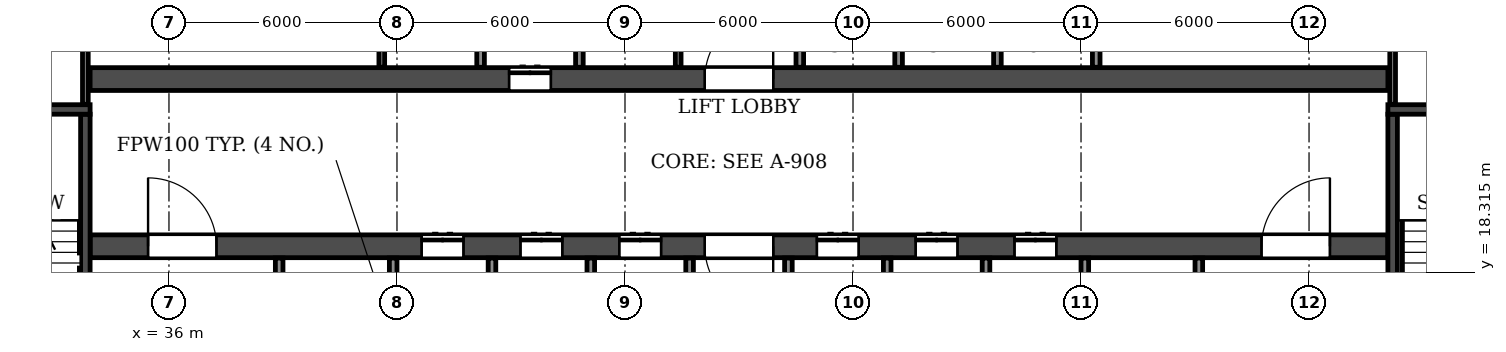
"""IFC4 building model, lengths in metres.
Left out: names, types, materials, properties, quantities, classifications, styles, units other than length and angle.
Written with IfcOpenShell. Run it as: python <this file> out.ifc"""

import sys

from ifc_helpers import new_model, si_unit, direction, frame, frame_2d, origin, place, context, subcontext, project, spatial, rectangle, extrude, element, fill, save


model = new_model("IFC4")
c1 = context("Model", 3, precision=1e-05, world=origin(), true_north=direction((0.0, 1.0)))
c2 = subcontext(c1, "Body", "Model", "MODEL_VIEW")
j1 = project(units=[si_unit("LENGTHUNIT", "METRE"), si_unit("PLANEANGLEUNIT", "RADIAN")], contexts=[c1])
p1 = place(None, origin())
s1 = spatial("IfcSite", under=j1, at=p1, CompositionType="ELEMENT")
p2 = place(p1, origin())
s2 = spatial("IfcBuilding", under=s1, at=p2, CompositionType="ELEMENT")
p3 = place(p2, frame((0.0, 0.0, 33.3)))
s3 = spatial("IfcBuildingStorey", under=s2, at=p3, CompositionType="ELEMENT", Elevation=33.3)
p4 = place(p3, frame((33.925, 19.0, 0.0), z_axis=(0.0, 0.0, 1.0), x_axis=(1.0, 0.0, 0.0)))
e1 = element("IfcWall", 1, at=p4, inside=s3, PredefinedType="SOLIDWALL", context=c2, shape_type="SweptSolid", body=[
    extrude(rectangle(XDim=34.15, YDim=0.6, at=frame_2d((17.075, 0.0))), origin(), (0.0, 0.0, 1.0), 3.05),
])
p5 = place(p4, frame((16.175, 0.0, 0.0)))
e2 = element("IfcOpeningElement", 2, at=p5, cuts=e1, PredefinedType="OPENING", context=c2, shape_type="SweptSolid", body=[
    extrude(rectangle(XDim=1.8, YDim=2.1, at=frame_2d((0.9, 1.05))), frame((0.0, 0.31, 0.0), z_axis=(0.0, -1.0, 0.0), x_axis=(1.0, 0.0, 0.0)), (0.0, 0.0, 1.0), 0.62),
])
p6 = place(p4, frame((1.525, 0.0, 0.0)))
e3 = element("IfcOpeningElement", 3, at=p6, cuts=e1, PredefinedType="OPENING", context=c2, shape_type="SweptSolid", body=[
    extrude(rectangle(XDim=1.8, YDim=2.1, at=frame_2d((0.9, 1.05))), frame((0.0, 0.31, 0.0), z_axis=(0.0, -1.0, 0.0), x_axis=(1.0, 0.0, 0.0)), (0.0, 0.0, 1.0), 0.62),
])
p7 = place(p4, frame((8.725, 0.0, 0.0)))
e4 = element("IfcOpeningElement", 4, at=p7, cuts=e1, PredefinedType="OPENING", context=c2, shape_type="SweptSolid", body=[
    extrude(rectangle(XDim=1.1, YDim=2.1, at=frame_2d((0.55, 1.05))), frame((0.0, 0.31, 0.0), z_axis=(0.0, -1.0, 0.0), x_axis=(1.0, 0.0, 0.0)), (0.0, 0.0, 1.0), 0.62),
])
p8 = place(p4, frame((11.325, 0.0, 0.0)))
e5 = element("IfcOpeningElement", 5, at=p8, cuts=e1, PredefinedType="OPENING", context=c2, shape_type="SweptSolid", body=[
    extrude(rectangle(XDim=1.1, YDim=2.1, at=frame_2d((0.55, 1.05))), frame((0.0, 0.31, 0.0), z_axis=(0.0, -1.0, 0.0), x_axis=(1.0, 0.0, 0.0)), (0.0, 0.0, 1.0), 0.62),
])
p9 = place(p4, frame((13.925, 0.0, 0.0)))
e6 = element("IfcOpeningElement", 6, at=p9, cuts=e1, PredefinedType="OPENING", context=c2, shape_type="SweptSolid", body=[
    extrude(rectangle(XDim=1.1, YDim=2.1, at=frame_2d((0.55, 1.05))), frame((0.0, 0.31, 0.0), z_axis=(0.0, -1.0, 0.0), x_axis=(1.0, 0.0, 0.0)), (0.0, 0.0, 1.0), 0.62),
])
p10 = place(p4, frame((19.125, 0.0, 0.0)))
e7 = element("IfcOpeningElement", 7, at=p10, cuts=e1, PredefinedType="OPENING", context=c2, shape_type="SweptSolid", body=[
    extrude(rectangle(XDim=1.1, YDim=2.1, at=frame_2d((0.55, 1.05))), frame((0.0, 0.31, 0.0), z_axis=(0.0, -1.0, 0.0), x_axis=(1.0, 0.0, 0.0)), (0.0, 0.0, 1.0), 0.62),
])
p11 = place(p4, frame((21.725, 0.0, 0.0)))
e8 = element("IfcOpeningElement", 8, at=p11, cuts=e1, PredefinedType="OPENING", context=c2, shape_type="SweptSolid", body=[
    extrude(rectangle(XDim=1.1, YDim=2.1, at=frame_2d((0.55, 1.05))), frame((0.0, 0.31, 0.0), z_axis=(0.0, -1.0, 0.0), x_axis=(1.0, 0.0, 0.0)), (0.0, 0.0, 1.0), 0.62),
])
p12 = place(p4, frame((24.325, 0.0, 0.0)))
e9 = element("IfcOpeningElement", 9, at=p12, cuts=e1, PredefinedType="OPENING", context=c2, shape_type="SweptSolid", body=[
    extrude(rectangle(XDim=1.1, YDim=2.1, at=frame_2d((0.55, 1.05))), frame((0.0, 0.31, 0.0), z_axis=(0.0, -1.0, 0.0), x_axis=(1.0, 0.0, 0.0)), (0.0, 0.0, 1.0), 0.62),
])
p13 = place(p4, frame((30.825, 0.0, 0.0)))
e10 = element("IfcOpeningElement", 10, at=p13, cuts=e1, PredefinedType="OPENING", context=c2, shape_type="SweptSolid", body=[
    extrude(rectangle(XDim=1.8, YDim=2.1, at=frame_2d((0.9, 1.05))), frame((0.0, 0.31, 0.0), z_axis=(0.0, -1.0, 0.0), x_axis=(1.0, 0.0, 0.0)), (0.0, 0.0, 1.0), 0.62),
])
p14 = place(p3, frame((33.925, 23.4, 0.0), z_axis=(0.0, 0.0, 1.0), x_axis=(1.0, 0.0, 0.0)))
e11 = element("IfcWall", 11, at=p14, inside=s3, PredefinedType="SOLIDWALL", context=c2, shape_type="SweptSolid", body=[
    extrude(rectangle(XDim=34.15, YDim=0.6, at=frame_2d((17.075, 0.0))), origin(), (0.0, 0.0, 1.0), 3.05),
])
p15 = place(p14, frame((16.175, 0.0, 0.0)))
e12 = element("IfcOpeningElement", 12, at=p15, cuts=e11, PredefinedType="OPENING", context=c2, shape_type="SweptSolid", body=[
    extrude(rectangle(XDim=1.8, YDim=2.1, at=frame_2d((0.9, 1.05))), frame((0.0, 0.31, 0.0), z_axis=(0.0, -1.0, 0.0), x_axis=(1.0, 0.0, 0.0)), (0.0, 0.0, 1.0), 0.62),
])
p16 = place(p14, frame((11.025, 0.0, 0.0)))
e13 = element("IfcOpeningElement", 13, at=p16, cuts=e11, PredefinedType="OPENING", context=c2, shape_type="SweptSolid", body=[
    extrude(rectangle(XDim=1.1, YDim=2.1, at=frame_2d((0.55, 1.05))), frame((0.0, 0.31, 0.0), z_axis=(0.0, -1.0, 0.0), x_axis=(1.0, 0.0, 0.0)), (0.0, 0.0, 1.0), 0.62),
])
p17 = place(p3, frame((33.8, 14.9, 0.0), z_axis=(0.0, 0.0, 1.0), x_axis=(0.0, 1.0, 0.0)))
e14 = element("IfcWall", 14, at=p17, inside=s3, PredefinedType="SOLIDWALL", context=c2, shape_type="SweptSolid", body=[
    extrude(rectangle(XDim=7.575, YDim=0.25, at=frame_2d((3.788, 0.0))), origin(), (0.0, 0.0, 1.0), 3.05),
])
p18 = place(p17, frame((0.4, 0.0, 0.0)))
e15 = element("IfcOpeningElement", 15, at=p18, cuts=e14, PredefinedType="OPENING", context=c2, shape_type="SweptSolid", body=[
    extrude(rectangle(XDim=1.0, YDim=2.1, at=frame_2d((0.5, 1.05))), frame((0.0, 0.135, 0.0), z_axis=(0.0, -1.0, 0.0), x_axis=(1.0, 0.0, 0.0)), (0.0, 0.0, 1.0), 0.27),
])
p19 = place(p3, frame((29.875, 22.6, 0.0), z_axis=(0.0, 0.0, 1.0), x_axis=(1.0, 0.0, 0.0)))
e16 = element("IfcWall", 16, at=p19, inside=s3, PredefinedType="SOLIDWALL", context=c2, shape_type="SweptSolid", body=[
    extrude(rectangle(XDim=4.05, YDim=0.25, at=frame_2d((2.025, 0.0))), origin(), (0.0, 0.0, 1.0), 3.05),
])
p20 = place(p3, frame((68.2, 14.9, 0.0), z_axis=(0.0, 0.0, 1.0), x_axis=(0.0, 1.0, 0.0)))
e17 = element("IfcWall", 17, at=p20, inside=s3, PredefinedType="SOLIDWALL", context=c2, shape_type="SweptSolid", body=[
    extrude(rectangle(XDim=7.575, YDim=0.25, at=frame_2d((3.788, 0.0))), origin(), (0.0, 0.0, 1.0), 3.05),
])
p21 = place(p20, frame((0.4, 0.0, 0.0)))
e18 = element("IfcOpeningElement", 18, at=p21, cuts=e17, PredefinedType="OPENING", context=c2, shape_type="SweptSolid", body=[
    extrude(rectangle(XDim=1.0, YDim=2.1, at=frame_2d((0.5, 1.05))), frame((0.0, 0.135, 0.0), z_axis=(0.0, -1.0, 0.0), x_axis=(1.0, 0.0, 0.0)), (0.0, 0.0, 1.0), 0.27),
])
p22 = place(p3, frame((68.075, 22.6, 0.0), z_axis=(0.0, 0.0, 1.0), x_axis=(1.0, 0.0, 0.0)))
e19 = element("IfcWall", 19, at=p22, inside=s3, PredefinedType="SOLIDWALL", context=c2, shape_type="SweptSolid", body=[
    extrude(rectangle(XDim=4.05, YDim=0.25, at=frame_2d((2.025, 0.0))), origin(), (0.0, 0.0, 1.0), 3.05),
])
for number, where, z_axis, x_axis in (
    (20, (49.4, 23.71, 0.0), (0.0, 0.0, 1.0), (0.0, 1.0, 0.0)),
    (21, (41.6, 23.71, 0.0), (0.0, 0.0, 1.0), (0.0, 1.0, 0.0)),
):
    element("IfcWall", number, at=place(p3, frame(where, z_axis=z_axis, x_axis=x_axis)), inside=s3, PredefinedType="PARTITIONING", context=c2, shape_type="SweptSolid", body=[
        extrude(rectangle(XDim=3.78, YDim=0.15, at=frame_2d((1.89, 0.0))), origin(), (0.0, 0.0, 1.0), 3.05),
    ])
for number, where, z_axis, x_axis in (
    (22, (33.8, 22.735, 0.0), (0.0, 0.0, 1.0), (0.0, 1.0, 0.0)),
    (23, (68.2, 22.735, 0.0), (0.0, 0.0, 1.0), (0.0, 1.0, 0.0)),
):
    element("IfcWall", number, at=place(p3, frame(where, z_axis=z_axis, x_axis=x_axis)), inside=s3, PredefinedType="PARTITIONING", context=c2, shape_type="SweptSolid", body=[
        extrude(rectangle(XDim=4.755, YDim=0.15, at=frame_2d((2.377, 0.0))), origin(), (0.0, 0.0, 1.0), 3.05),
    ])
p23 = place(p3, frame((38.9, 14.91, 0.0), z_axis=(0.0, 0.0, 1.0), x_axis=(0.0, 1.0, 0.0)))
e24 = element("IfcWall", 24, at=p23, inside=s3, PredefinedType="PARTITIONING", context=c2, shape_type="SweptSolid", body=[
    extrude(rectangle(XDim=3.78, YDim=0.2, at=frame_2d((1.89, 0.0))), origin(), (0.0, 0.0, 1.0), 3.05),
])
p24 = place(p23, frame((1.34, 0.0, 0.0)))
e25 = element("IfcOpeningElement", 25, at=p24, cuts=e24, PredefinedType="OPENING", context=c2, shape_type="SweptSolid", body=[
    extrude(rectangle(XDim=1.1, YDim=2.1, at=frame_2d((0.55, 1.05))), frame((0.0, 0.11, 0.0), z_axis=(0.0, -1.0, 0.0), x_axis=(1.0, 0.0, 0.0)), (0.0, 0.0, 1.0), 0.22),
])
for number, where, z_axis, x_axis in (
    (26, (41.9, 14.91, 0.0), (0.0, 0.0, 1.0), (0.0, 1.0, 0.0)),
    (27, (44.2, 23.71, 0.0), (0.0, 0.0, 1.0), (0.0, 1.0, 0.0)),
):
    element("IfcWall", number, at=place(p3, frame(where, z_axis=z_axis, x_axis=x_axis)), inside=s3, PredefinedType="PARTITIONING", context=c2, shape_type="SweptSolid", body=[
        extrude(rectangle(XDim=3.78, YDim=0.2, at=frame_2d((1.89, 0.0))), origin(), (0.0, 0.0, 1.0), 3.05),
    ])
p25 = place(p3, frame((44.5, 16.3, 0.0), z_axis=(0.0, 0.0, 1.0), x_axis=(0.0, 1.0, 0.0)))
e28 = element("IfcWall", 28, at=p25, inside=s3, PredefinedType="PARTITIONING", context=c2, shape_type="SweptSolid", body=[
    extrude(rectangle(XDim=2.39, YDim=0.2, at=frame_2d((1.195, 0.0))), origin(), (0.0, 0.0, 1.0), 3.05),
])
p26 = place(p3, frame((46.8, 23.71, 0.0), z_axis=(0.0, 0.0, 1.0), x_axis=(0.0, 1.0, 0.0)))
e29 = element("IfcWall", 29, at=p26, inside=s3, PredefinedType="PARTITIONING", context=c2, shape_type="SweptSolid", body=[
    extrude(rectangle(XDim=3.78, YDim=0.2, at=frame_2d((1.89, 0.0))), origin(), (0.0, 0.0, 1.0), 3.05),
])
for number, where, z_axis, x_axis in (
    (30, (47.1, 16.3, 0.0), (0.0, 0.0, 1.0), (0.0, 1.0, 0.0)),
    (31, (49.7, 16.3, 0.0), (0.0, 0.0, 1.0), (0.0, 1.0, 0.0)),
    (32, (52.3, 16.3, 0.0), (0.0, 0.0, 1.0), (0.0, 1.0, 0.0)),
):
    element("IfcWall", number, at=place(p3, frame(where, z_axis=z_axis, x_axis=x_axis)), inside=s3, PredefinedType="PARTITIONING", context=c2, shape_type="SweptSolid", body=[
        extrude(rectangle(XDim=2.39, YDim=0.2, at=frame_2d((1.195, 0.0))), origin(), (0.0, 0.0, 1.0), 3.05),
    ])
p27 = place(p3, frame((52.6, 23.71, 0.0), z_axis=(0.0, 0.0, 1.0), x_axis=(0.0, 1.0, 0.0)))
e33 = element("IfcWall", 33, at=p27, inside=s3, PredefinedType="PARTITIONING", context=c2, shape_type="SweptSolid", body=[
    extrude(rectangle(XDim=2.39, YDim=0.2, at=frame_2d((1.195, 0.0))), origin(), (0.0, 0.0, 1.0), 3.05),
])
p28 = place(p3, frame((54.9, 16.3, 0.0), z_axis=(0.0, 0.0, 1.0), x_axis=(0.0, 1.0, 0.0)))
e34 = element("IfcWall", 34, at=p28, inside=s3, PredefinedType="PARTITIONING", context=c2, shape_type="SweptSolid", body=[
    extrude(rectangle(XDim=2.39, YDim=0.2, at=frame_2d((1.195, 0.0))), origin(), (0.0, 0.0, 1.0), 3.05),
])
p29 = place(p3, frame((55.2, 23.71, 0.0), z_axis=(0.0, 0.0, 1.0), x_axis=(0.0, 1.0, 0.0)))
e35 = element("IfcWall", 35, at=p29, inside=s3, PredefinedType="PARTITIONING", context=c2, shape_type="SweptSolid", body=[
    extrude(rectangle(XDim=2.39, YDim=0.2, at=frame_2d((1.195, 0.0))), origin(), (0.0, 0.0, 1.0), 3.05),
])
p30 = place(p3, frame((57.5, 16.3, 0.0), z_axis=(0.0, 0.0, 1.0), x_axis=(0.0, 1.0, 0.0)))
e36 = element("IfcWall", 36, at=p30, inside=s3, PredefinedType="PARTITIONING", context=c2, shape_type="SweptSolid", body=[
    extrude(rectangle(XDim=2.39, YDim=0.2, at=frame_2d((1.195, 0.0))), origin(), (0.0, 0.0, 1.0), 3.05),
])
p31 = place(p3, frame((57.8, 23.71, 0.0), z_axis=(0.0, 0.0, 1.0), x_axis=(0.0, 1.0, 0.0)))
e37 = element("IfcWall", 37, at=p31, inside=s3, PredefinedType="PARTITIONING", context=c2, shape_type="SweptSolid", body=[
    extrude(rectangle(XDim=2.39, YDim=0.2, at=frame_2d((1.195, 0.0))), origin(), (0.0, 0.0, 1.0), 3.05),
])
p32 = place(p3, frame((60.1, 14.91, 0.0), z_axis=(0.0, 0.0, 1.0), x_axis=(0.0, 1.0, 0.0)))
e38 = element("IfcWall", 38, at=p32, inside=s3, PredefinedType="PARTITIONING", context=c2, shape_type="SweptSolid", body=[
    extrude(rectangle(XDim=3.78, YDim=0.2, at=frame_2d((1.89, 0.0))), origin(), (0.0, 0.0, 1.0), 3.05),
])
p33 = place(p3, frame((60.4, 23.71, 0.0), z_axis=(0.0, 0.0, 1.0), x_axis=(0.0, 1.0, 0.0)))
e39 = element("IfcWall", 39, at=p33, inside=s3, PredefinedType="PARTITIONING", context=c2, shape_type="SweptSolid", body=[
    extrude(rectangle(XDim=2.39, YDim=0.2, at=frame_2d((1.195, 0.0))), origin(), (0.0, 0.0, 1.0), 3.05),
])
p34 = place(p3, frame((63.1, 14.91, 0.0), z_axis=(0.0, 0.0, 1.0), x_axis=(0.0, 1.0, 0.0)))
e40 = element("IfcWall", 40, at=p34, inside=s3, PredefinedType="PARTITIONING", context=c2, shape_type="SweptSolid", body=[
    extrude(rectangle(XDim=3.78, YDim=0.2, at=frame_2d((1.89, 0.0))), origin(), (0.0, 0.0, 1.0), 3.05),
])
p35 = place(p34, frame((1.34, 0.0, 0.0)))
e41 = element("IfcOpeningElement", 41, at=p35, cuts=e40, PredefinedType="OPENING", context=c2, shape_type="SweptSolid", body=[
    extrude(rectangle(XDim=1.1, YDim=2.1, at=frame_2d((0.55, 1.05))), frame((0.0, 0.11, 0.0), z_axis=(0.0, -1.0, 0.0), x_axis=(1.0, 0.0, 0.0)), (0.0, 0.0, 1.0), 0.22),
])
p36 = place(p15, origin())
e42 = element("IfcDoor", 42, at=p36, inside=s3, OperationType="DOUBLE_DOOR_SINGLE_SWING", PredefinedType="DOOR", context=c2, shape_type="SweptSolid", body=[
    extrude(rectangle(XDim=1.8, YDim=2.1, at=frame_2d((0.9, 1.05))), frame((0.0, 0.025, 0.0), z_axis=(0.0, -1.0, 0.0), x_axis=(1.0, 0.0, 0.0)), (0.0, 0.0, 1.0), 0.05),
])
fill(e12, e42)
p37 = place(p5, frame((1.8, 0.0, 0.0), z_axis=(0.0, 0.0, 1.0), x_axis=(-1.0, 0.0, 0.0)))
e43 = element("IfcDoor", 43, at=p37, inside=s3, OperationType="DOUBLE_DOOR_SINGLE_SWING", PredefinedType="DOOR", context=c2, shape_type="SweptSolid", body=[
    extrude(rectangle(XDim=1.8, YDim=2.1, at=frame_2d((0.9, 1.05))), frame((0.0, 0.025, 0.0), z_axis=(0.0, -1.0, 0.0), x_axis=(1.0, 0.0, 0.0)), (0.0, 0.0, 1.0), 0.05),
])
fill(e2, e43)
p38 = place(p6, origin())
e44 = element("IfcDoor", 44, at=p38, inside=s3, OperationType="DOUBLE_DOOR_SINGLE_SWING", PredefinedType="DOOR", context=c2, shape_type="SweptSolid", body=[
    extrude(rectangle(XDim=1.8, YDim=2.1, at=frame_2d((0.9, 1.05))), frame((0.0, 0.025, 0.0), z_axis=(0.0, -1.0, 0.0), x_axis=(1.0, 0.0, 0.0)), (0.0, 0.0, 1.0), 0.05),
])
fill(e3, e44)
p39 = place(p7, origin())
e45 = element("IfcDoor", 45, at=p39, inside=s3, OperationType="DOUBLE_DOOR_SLIDING", PredefinedType="DOOR", context=c2, shape_type="SweptSolid", body=[
    extrude(rectangle(XDim=1.1, YDim=2.1, at=frame_2d((0.55, 1.05))), frame((0.0, 0.025, 0.0), z_axis=(0.0, -1.0, 0.0), x_axis=(1.0, 0.0, 0.0)), (0.0, 0.0, 1.0), 0.05),
])
fill(e4, e45)
p40 = place(p16, origin())
e46 = element("IfcDoor", 46, at=p40, inside=s3, OperationType="DOUBLE_DOOR_SLIDING", PredefinedType="DOOR", context=c2, shape_type="SweptSolid", body=[
    extrude(rectangle(XDim=1.1, YDim=2.1, at=frame_2d((0.55, 1.05))), frame((0.0, 0.025, 0.0), z_axis=(0.0, -1.0, 0.0), x_axis=(1.0, 0.0, 0.0)), (0.0, 0.0, 1.0), 0.05),
])
fill(e13, e46)
p41 = place(p8, origin())
e47 = element("IfcDoor", 47, at=p41, inside=s3, OperationType="DOUBLE_DOOR_SLIDING", PredefinedType="DOOR", context=c2, shape_type="SweptSolid", body=[
    extrude(rectangle(XDim=1.1, YDim=2.1, at=frame_2d((0.55, 1.05))), frame((0.0, 0.025, 0.0), z_axis=(0.0, -1.0, 0.0), x_axis=(1.0, 0.0, 0.0)), (0.0, 0.0, 1.0), 0.05),
])
fill(e5, e47)
p42 = place(p9, origin())
e48 = element("IfcDoor", 48, at=p42, inside=s3, OperationType="DOUBLE_DOOR_SLIDING", PredefinedType="DOOR", context=c2, shape_type="SweptSolid", body=[
    extrude(rectangle(XDim=1.1, YDim=2.1, at=frame_2d((0.55, 1.05))), frame((0.0, 0.025, 0.0), z_axis=(0.0, -1.0, 0.0), x_axis=(1.0, 0.0, 0.0)), (0.0, 0.0, 1.0), 0.05),
])
fill(e6, e48)
p43 = place(p10, origin())
e49 = element("IfcDoor", 49, at=p43, inside=s3, OperationType="DOUBLE_DOOR_SLIDING", PredefinedType="DOOR", context=c2, shape_type="SweptSolid", body=[
    extrude(rectangle(XDim=1.1, YDim=2.1, at=frame_2d((0.55, 1.05))), frame((0.0, 0.025, 0.0), z_axis=(0.0, -1.0, 0.0), x_axis=(1.0, 0.0, 0.0)), (0.0, 0.0, 1.0), 0.05),
])
fill(e7, e49)
p44 = place(p11, origin())
e50 = element("IfcDoor", 50, at=p44, inside=s3, OperationType="DOUBLE_DOOR_SLIDING", PredefinedType="DOOR", context=c2, shape_type="SweptSolid", body=[
    extrude(rectangle(XDim=1.1, YDim=2.1, at=frame_2d((0.55, 1.05))), frame((0.0, 0.025, 0.0), z_axis=(0.0, -1.0, 0.0), x_axis=(1.0, 0.0, 0.0)), (0.0, 0.0, 1.0), 0.05),
])
fill(e8, e50)
p45 = place(p12, origin())
e51 = element("IfcDoor", 51, at=p45, inside=s3, OperationType="DOUBLE_DOOR_SLIDING", PredefinedType="DOOR", context=c2, shape_type="SweptSolid", body=[
    extrude(rectangle(XDim=1.1, YDim=2.1, at=frame_2d((0.55, 1.05))), frame((0.0, 0.025, 0.0), z_axis=(0.0, -1.0, 0.0), x_axis=(1.0, 0.0, 0.0)), (0.0, 0.0, 1.0), 0.05),
])
fill(e9, e51)
p46 = place(p13, origin())
e52 = element("IfcDoor", 52, at=p46, inside=s3, OperationType="DOUBLE_DOOR_SINGLE_SWING", PredefinedType="DOOR", context=c2, shape_type="SweptSolid", body=[
    extrude(rectangle(XDim=1.8, YDim=2.1, at=frame_2d((0.9, 1.05))), frame((0.0, 0.025, 0.0), z_axis=(0.0, -1.0, 0.0), x_axis=(1.0, 0.0, 0.0)), (0.0, 0.0, 1.0), 0.05),
])
fill(e10, e52)
save(model, sys.argv[1])
